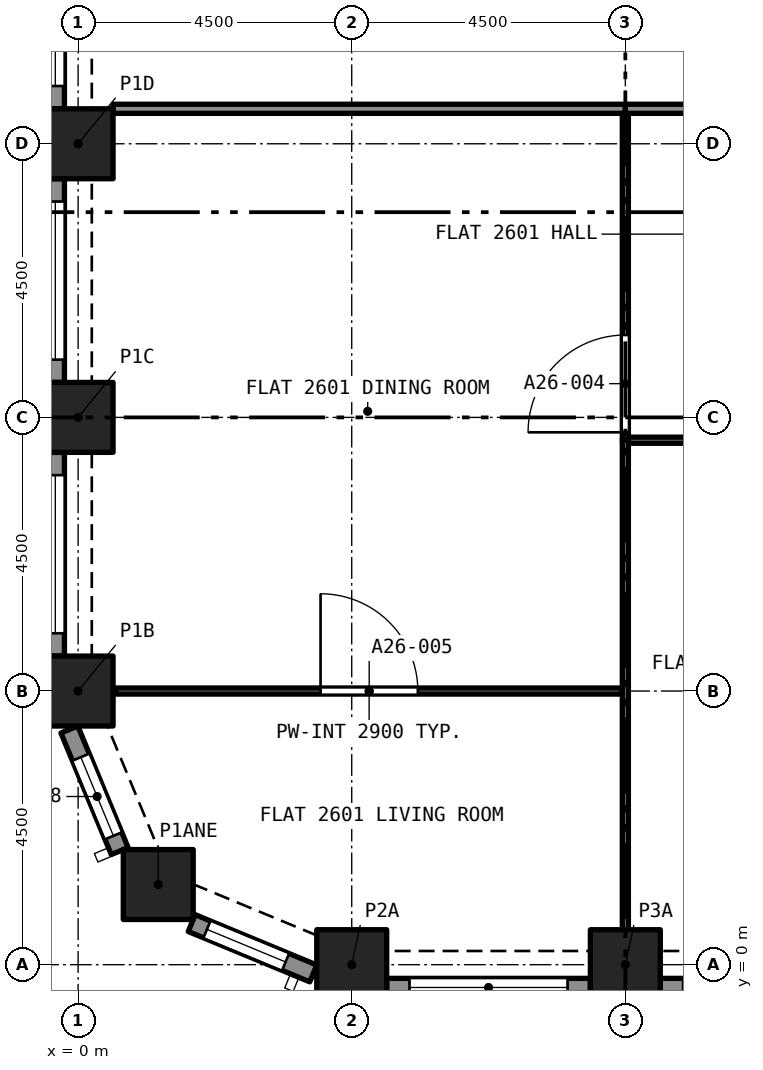
"""IFC4 building model, lengths in metres.
Left out: names, types, materials, properties, quantities, classifications, styles, units other than length and angle.
Written with IfcOpenShell. Run it as: python <this file> out.ifc"""

import sys

from ifc_helpers import new_model, si_unit, direction, frame, frame_2d, origin, origin_2d, place, context, subcontext, project, spatial, rectangle, extrude, element, fill, save


model = new_model("IFC4")
c1 = context("Model", 3, precision=1e-05, world=origin(), true_north=direction((0.0, 1.0)))
c2 = subcontext(c1, "Body", "Model", "MODEL_VIEW")
j1 = project(units=[si_unit("LENGTHUNIT", "METRE"), si_unit("PLANEANGLEUNIT", "RADIAN")], contexts=[c1])
p1 = place(None, origin())
s1 = spatial("IfcSite", under=j1, at=p1, CompositionType="ELEMENT")
p2 = place(p1, origin())
s2 = spatial("IfcBuilding", under=s1, at=p2, CompositionType="ELEMENT")
p3 = place(p2, frame((0.0, 0.0, 96.0)))
s3 = spatial("IfcBuildingStorey", under=s2, at=p3, CompositionType="ELEMENT", Elevation=96.0)
for number, where, z_axis, x_axis in (
    (1, (4.5, 0.0, 0.0), (0.0, 0.0, 1.0), (1.0, 0.0, 0.0)),
    (2, (9.0, 0.0, 0.0), (0.0, 0.0, 1.0), (1.0, 0.0, 0.0)),
    (3, (1.318, 1.318, 0.0), (0.0, 0.0, 1.0), (1.0, 0.0, 0.0)),
    (4, (0.0, 4.5, 0.0), (0.0, 0.0, 1.0), (1.0, 0.0, 0.0)),
    (5, (0.0, 9.0, 0.0), (0.0, 0.0, 1.0), (1.0, 0.0, 0.0)),
    (6, (0.0, 13.5, 0.0), (0.0, 0.0, 1.0), (1.0, 0.0, 0.0)),
):
    element("IfcColumn", number, at=place(p3, frame(where, z_axis=z_axis, x_axis=x_axis)), inside=s3, PredefinedType="COLUMN", context=c2, shape_type="SweptSolid", body=[
        extrude(rectangle(XDim=1.15, YDim=1.15, at=origin_2d()), origin(), (0.0, 0.0, 1.0), 3.2),
    ])
p4 = place(p3, frame((0.684, 1.869, 0.0), z_axis=(0.0, 0.0, 1.0), x_axis=(-0.382723818695, 0.923862802911, 0.0)))
e7 = element("IfcWall", 7, at=p4, inside=s3, PredefinedType="SOLIDWALL", context=c2, shape_type="SweptSolid", body=[
    extrude(rectangle(XDim=2.164, YDim=0.3, at=frame_2d((1.082, 0.0))), origin(), (0.0, 0.0, 1.0), 3.2),
])
p5 = place(p4, frame((0.271, 0.0, 0.45)))
e8 = element("IfcOpeningElement", 8, at=p5, cuts=e7, PredefinedType="OPENING", context=c2, shape_type="SweptSolid", body=[
    extrude(rectangle(XDim=1.4, YDim=1.95, at=frame_2d((0.7, 0.975))), frame((0.0, 0.16, 0.0), z_axis=(0.0, -1.0, 0.0), x_axis=(1.0, 0.0, 0.0)), (0.0, 0.0, 1.0), 0.32),
])
p6 = place(p3, frame((3.868, -0.144, 0.0), z_axis=(0.0, 0.0, 1.0), x_axis=(-0.923862802911, 0.382723818695, 0.0)))
e9 = element("IfcWall", 9, at=p6, inside=s3, PredefinedType="SOLIDWALL", context=c2, shape_type="SweptSolid", body=[
    extrude(rectangle(XDim=2.164, YDim=0.3, at=frame_2d((1.082, 0.0))), origin(), (0.0, 0.0, 1.0), 3.2),
])
p7 = place(p6, frame((0.493, 0.0, 0.45)))
e10 = element("IfcOpeningElement", 10, at=p7, cuts=e9, PredefinedType="OPENING", context=c2, shape_type="SweptSolid", body=[
    extrude(rectangle(XDim=1.4, YDim=1.95, at=frame_2d((0.7, 0.975))), frame((0.0, 0.16, 0.0), z_axis=(0.0, -1.0, 0.0), x_axis=(1.0, 0.0, 0.0)), (0.0, 0.0, 1.0), 0.32),
])
p8 = place(p3, frame((8.425, -0.375, 0.0), z_axis=(0.0, 0.0, 1.0), x_axis=(-1.0, 0.0, 0.0)))
e11 = element("IfcWall", 11, at=p8, inside=s3, PredefinedType="SOLIDWALL", context=c2, shape_type="SweptSolid", body=[
    extrude(rectangle(XDim=3.35, YDim=0.3, at=frame_2d((1.675, 0.0))), origin(), (0.0, 0.0, 1.0), 3.2),
])
p9 = place(p8, frame((0.375, 0.0, 0.45)))
e12 = element("IfcOpeningElement", 12, at=p9, cuts=e11, PredefinedType="OPENING", context=c2, shape_type="SweptSolid", body=[
    extrude(rectangle(XDim=2.6, YDim=1.95, at=frame_2d((1.3, 0.975))), frame((0.0, 0.16, 0.0), z_axis=(0.0, -1.0, 0.0), x_axis=(1.0, 0.0, 0.0)), (0.0, 0.0, 1.0), 0.32),
])
p10 = place(p3, frame((12.925, -0.375, 0.0), z_axis=(0.0, 0.0, 1.0), x_axis=(-1.0, 0.0, 0.0)))
e13 = element("IfcWall", 13, at=p10, inside=s3, PredefinedType="SOLIDWALL", context=c2, shape_type="SweptSolid", body=[
    extrude(rectangle(XDim=3.35, YDim=0.3, at=frame_2d((1.675, 0.0))), origin(), (0.0, 0.0, 1.0), 3.2),
])
p11 = place(p10, frame((0.375, 0.0, 0.45)))
e14 = element("IfcOpeningElement", 14, at=p11, cuts=e13, PredefinedType="OPENING", context=c2, shape_type="SweptSolid", body=[
    extrude(rectangle(XDim=2.6, YDim=1.95, at=frame_2d((1.3, 0.975))), frame((0.0, 0.16, 0.0), z_axis=(0.0, -1.0, 0.0), x_axis=(1.0, 0.0, 0.0)), (0.0, 0.0, 1.0), 0.32),
])
p12 = place(p3, frame((-0.375, 14.075, 0.0), z_axis=(0.0, 0.0, 1.0), x_axis=(0.0, 1.0, 0.0)))
e15 = element("IfcWall", 15, at=p12, inside=s3, PredefinedType="SOLIDWALL", context=c2, shape_type="SweptSolid", body=[
    extrude(rectangle(XDim=3.35, YDim=0.3, at=frame_2d((1.675, 0.0))), origin(), (0.0, 0.0, 1.0), 3.2),
])
p13 = place(p12, frame((0.375, 0.0, 0.45)))
e16 = element("IfcOpeningElement", 16, at=p13, cuts=e15, PredefinedType="OPENING", context=c2, shape_type="SweptSolid", body=[
    extrude(rectangle(XDim=2.6, YDim=1.95, at=frame_2d((1.3, 0.975))), frame((0.0, 0.16, 0.0), z_axis=(0.0, -1.0, 0.0), x_axis=(1.0, 0.0, 0.0)), (0.0, 0.0, 1.0), 0.32),
])
p14 = place(p3, frame((-0.375, 9.575, 0.0), z_axis=(0.0, 0.0, 1.0), x_axis=(0.0, 1.0, 0.0)))
e17 = element("IfcWall", 17, at=p14, inside=s3, PredefinedType="SOLIDWALL", context=c2, shape_type="SweptSolid", body=[
    extrude(rectangle(XDim=3.35, YDim=0.3, at=frame_2d((1.675, 0.0))), origin(), (0.0, 0.0, 1.0), 3.2),
])
p15 = place(p14, frame((0.375, 0.0, 0.45)))
e18 = element("IfcOpeningElement", 18, at=p15, cuts=e17, PredefinedType="OPENING", context=c2, shape_type="SweptSolid", body=[
    extrude(rectangle(XDim=2.6, YDim=1.95, at=frame_2d((1.3, 0.975))), frame((0.0, 0.16, 0.0), z_axis=(0.0, -1.0, 0.0), x_axis=(1.0, 0.0, 0.0)), (0.0, 0.0, 1.0), 0.32),
])
p16 = place(p3, frame((-0.375, 5.075, 0.0), z_axis=(0.0, 0.0, 1.0), x_axis=(0.0, 1.0, 0.0)))
e19 = element("IfcWall", 19, at=p16, inside=s3, PredefinedType="SOLIDWALL", context=c2, shape_type="SweptSolid", body=[
    extrude(rectangle(XDim=3.35, YDim=0.3, at=frame_2d((1.675, 0.0))), origin(), (0.0, 0.0, 1.0), 3.2),
])
p17 = place(p16, frame((0.375, 0.0, 0.45)))
e20 = element("IfcOpeningElement", 20, at=p17, cuts=e19, PredefinedType="OPENING", context=c2, shape_type="SweptSolid", body=[
    extrude(rectangle(XDim=2.6, YDim=1.95, at=frame_2d((1.3, 0.975))), frame((0.0, 0.16, 0.0), z_axis=(0.0, -1.0, 0.0), x_axis=(1.0, 0.0, 0.0)), (0.0, 0.0, 1.0), 0.32),
])
p18 = place(p3, frame((13.5, 8.625, 0.0), z_axis=(0.0, 0.0, 1.0), x_axis=(-1.0, 0.0, 0.0)))
e21 = element("IfcWall", 21, at=p18, inside=s3, PredefinedType="PARTITIONING", context=c2, shape_type="SweptSolid", body=[
    extrude(rectangle(XDim=4.45, YDim=0.1, at=frame_2d((2.225, 0.0))), origin(), (0.0, 0.0, 1.0), 2.9),
])
p19 = place(p18, frame((1.8, 0.0, 0.0)))
e22 = element("IfcOpeningElement", 22, at=p19, cuts=e21, PredefinedType="OPENING", context=c2, shape_type="SweptSolid", body=[
    extrude(rectangle(XDim=0.9, YDim=2.1, at=frame_2d((0.45, 1.05))), frame((0.0, 0.06, 0.0), z_axis=(0.0, -1.0, 0.0), x_axis=(1.0, 0.0, 0.0)), (0.0, 0.0, 1.0), 0.12),
])
p20 = place(p3, frame((9.0, 0.575, 0.0), z_axis=(0.0, 0.0, 1.0), x_axis=(0.0, 1.0, 0.0)))
e23 = element("IfcWall", 23, at=p20, inside=s3, PredefinedType="PARTITIONING", context=c2, shape_type="SweptSolid", body=[
    extrude(rectangle(XDim=8.05, YDim=0.1, at=frame_2d((4.025, 0.0))), origin(), (0.0, 0.0, 1.0), 2.9),
])
p21 = place(p3, frame((9.0, 8.625, 0.0), z_axis=(0.0, 0.0, 1.0), x_axis=(0.0, 1.0, 0.0)))
e24 = element("IfcWall", 24, at=p21, inside=s3, PredefinedType="PARTITIONING", context=c2, shape_type="SweptSolid", body=[
    extrude(rectangle(XDim=5.375, YDim=0.1, at=frame_2d((2.688, 0.0))), origin(), (0.0, 0.0, 1.0), 2.9),
])
p22 = place(p21, frame((0.13, 0.0, 0.0)))
e25 = element("IfcOpeningElement", 25, at=p22, cuts=e24, PredefinedType="OPENING", context=c2, shape_type="SweptSolid", body=[
    extrude(rectangle(XDim=1.6, YDim=2.1, at=frame_2d((0.8, 1.05))), frame((0.0, 0.06, 0.0), z_axis=(0.0, -1.0, 0.0), x_axis=(1.0, 0.0, 0.0)), (0.0, 0.0, 1.0), 0.12),
])
p23 = place(p3, frame((0.622, 4.5, 0.0), z_axis=(0.0, 0.0, 1.0), x_axis=(1.0, 0.0, 0.0)))
e26 = element("IfcWall", 26, at=p23, inside=s3, PredefinedType="PARTITIONING", context=c2, shape_type="SweptSolid", body=[
    extrude(rectangle(XDim=8.328, YDim=0.1, at=frame_2d((4.164, 0.0))), origin(), (0.0, 0.0, 1.0), 2.9),
])
p24 = place(p23, frame((3.365, 0.0, 0.0)))
e27 = element("IfcOpeningElement", 27, at=p24, cuts=e26, PredefinedType="OPENING", context=c2, shape_type="SweptSolid", body=[
    extrude(rectangle(XDim=1.6, YDim=2.1, at=frame_2d((0.8, 1.05))), frame((0.0, 0.06, 0.0), z_axis=(0.0, -1.0, 0.0), x_axis=(1.0, 0.0, 0.0)), (0.0, 0.0, 1.0), 0.12),
])
p25 = place(p3, frame((0.575, 14.075, 0.0), z_axis=(0.0, 0.0, 1.0), x_axis=(1.0, 0.0, 0.0)))
e28 = element("IfcWall", 28, at=p25, inside=s3, PredefinedType="PARTITIONING", context=c2, shape_type="SweptSolid", body=[
    extrude(rectangle(XDim=8.425, YDim=0.15, at=frame_2d((4.212, 0.0))), origin(), (0.0, 0.0, 1.0), 2.9),
])
p26 = place(p3, frame((11.925, 14.075, 0.0), z_axis=(0.0, 0.0, 1.0), x_axis=(-1.0, 0.0, 0.0)))
e29 = element("IfcWall", 29, at=p26, inside=s3, PredefinedType="PARTITIONING", context=c2, shape_type="SweptSolid", body=[
    extrude(rectangle(XDim=2.925, YDim=0.15, at=frame_2d((1.462, 0.0))), origin(), (0.0, 0.0, 1.0), 2.9),
])
p27 = place(p26, frame((0.175, 0.0, 0.0)))
e30 = element("IfcOpeningElement", 30, at=p27, cuts=e29, PredefinedType="OPENING", context=c2, shape_type="SweptSolid", body=[
    extrude(rectangle(XDim=1.0, YDim=2.1, at=frame_2d((0.5, 1.05))), frame((0.0, 0.085, 0.0), z_axis=(0.0, -1.0, 0.0), x_axis=(1.0, 0.0, 0.0)), (0.0, 0.0, 1.0), 0.17),
])
p28 = place(p5, origin())
e31 = element("IfcWindow", 31, at=p28, inside=s3, PartitioningType="SINGLE_PANEL", PredefinedType="WINDOW", context=c2, shape_type="SweptSolid", body=[
    extrude(rectangle(XDim=1.4, YDim=1.95, at=frame_2d((0.7, 0.975))), frame((0.0, 0.03, 0.0), z_axis=(0.0, -1.0, 0.0), x_axis=(1.0, 0.0, 0.0)), (0.0, 0.0, 1.0), 0.06),
])
fill(e8, e31)
p29 = place(p7, origin())
e32 = element("IfcWindow", 32, at=p29, inside=s3, PartitioningType="SINGLE_PANEL", PredefinedType="WINDOW", context=c2, shape_type="SweptSolid", body=[
    extrude(rectangle(XDim=1.4, YDim=1.95, at=frame_2d((0.7, 0.975))), frame((0.0, 0.03, 0.0), z_axis=(0.0, -1.0, 0.0), x_axis=(1.0, 0.0, 0.0)), (0.0, 0.0, 1.0), 0.06),
])
fill(e10, e32)
p30 = place(p9, origin())
e33 = element("IfcWindow", 33, at=p30, inside=s3, PartitioningType="SINGLE_PANEL", PredefinedType="WINDOW", context=c2, shape_type="SweptSolid", body=[
    extrude(rectangle(XDim=2.6, YDim=1.95, at=frame_2d((1.3, 0.975))), frame((0.0, 0.03, 0.0), z_axis=(0.0, -1.0, 0.0), x_axis=(1.0, 0.0, 0.0)), (0.0, 0.0, 1.0), 0.06),
])
fill(e12, e33)
p31 = place(p13, origin())
e34 = element("IfcWindow", 34, at=p31, inside=s3, PartitioningType="SINGLE_PANEL", PredefinedType="WINDOW", context=c2, shape_type="SweptSolid", body=[
    extrude(rectangle(XDim=2.6, YDim=1.95, at=frame_2d((1.3, 0.975))), frame((0.0, 0.03, 0.0), z_axis=(0.0, -1.0, 0.0), x_axis=(1.0, 0.0, 0.0)), (0.0, 0.0, 1.0), 0.06),
])
fill(e16, e34)
p32 = place(p15, origin())
e35 = element("IfcWindow", 35, at=p32, inside=s3, PartitioningType="SINGLE_PANEL", PredefinedType="WINDOW", context=c2, shape_type="SweptSolid", body=[
    extrude(rectangle(XDim=2.6, YDim=1.95, at=frame_2d((1.3, 0.975))), frame((0.0, 0.03, 0.0), z_axis=(0.0, -1.0, 0.0), x_axis=(1.0, 0.0, 0.0)), (0.0, 0.0, 1.0), 0.06),
])
fill(e18, e35)
p33 = place(p17, origin())
e36 = element("IfcWindow", 36, at=p33, inside=s3, PartitioningType="SINGLE_PANEL", PredefinedType="WINDOW", context=c2, shape_type="SweptSolid", body=[
    extrude(rectangle(XDim=2.6, YDim=1.95, at=frame_2d((1.3, 0.975))), frame((0.0, 0.03, 0.0), z_axis=(0.0, -1.0, 0.0), x_axis=(1.0, 0.0, 0.0)), (0.0, 0.0, 1.0), 0.06),
])
fill(e20, e36)
p34 = place(p22, origin())
e37 = element("IfcDoor", 37, at=p34, inside=s3, OperationType="SINGLE_SWING_LEFT", PredefinedType="DOOR", context=c2, shape_type="SweptSolid", body=[
    extrude(rectangle(XDim=1.6, YDim=2.1, at=frame_2d((0.8, 1.05))), frame((0.0, 0.025, 0.0), z_axis=(0.0, -1.0, 0.0), x_axis=(1.0, 0.0, 0.0)), (0.0, 0.0, 1.0), 0.05),
])
fill(e25, e37)
p35 = place(p24, origin())
e38 = element("IfcDoor", 38, at=p35, inside=s3, OperationType="SINGLE_SWING_RIGHT", PredefinedType="DOOR", context=c2, shape_type="SweptSolid", body=[
    extrude(rectangle(XDim=1.6, YDim=2.1, at=frame_2d((0.8, 1.05))), frame((0.0, 0.025, 0.0), z_axis=(0.0, -1.0, 0.0), x_axis=(1.0, 0.0, 0.0)), (0.0, 0.0, 1.0), 0.05),
])
fill(e27, e38)
save(model, sys.argv[1])
